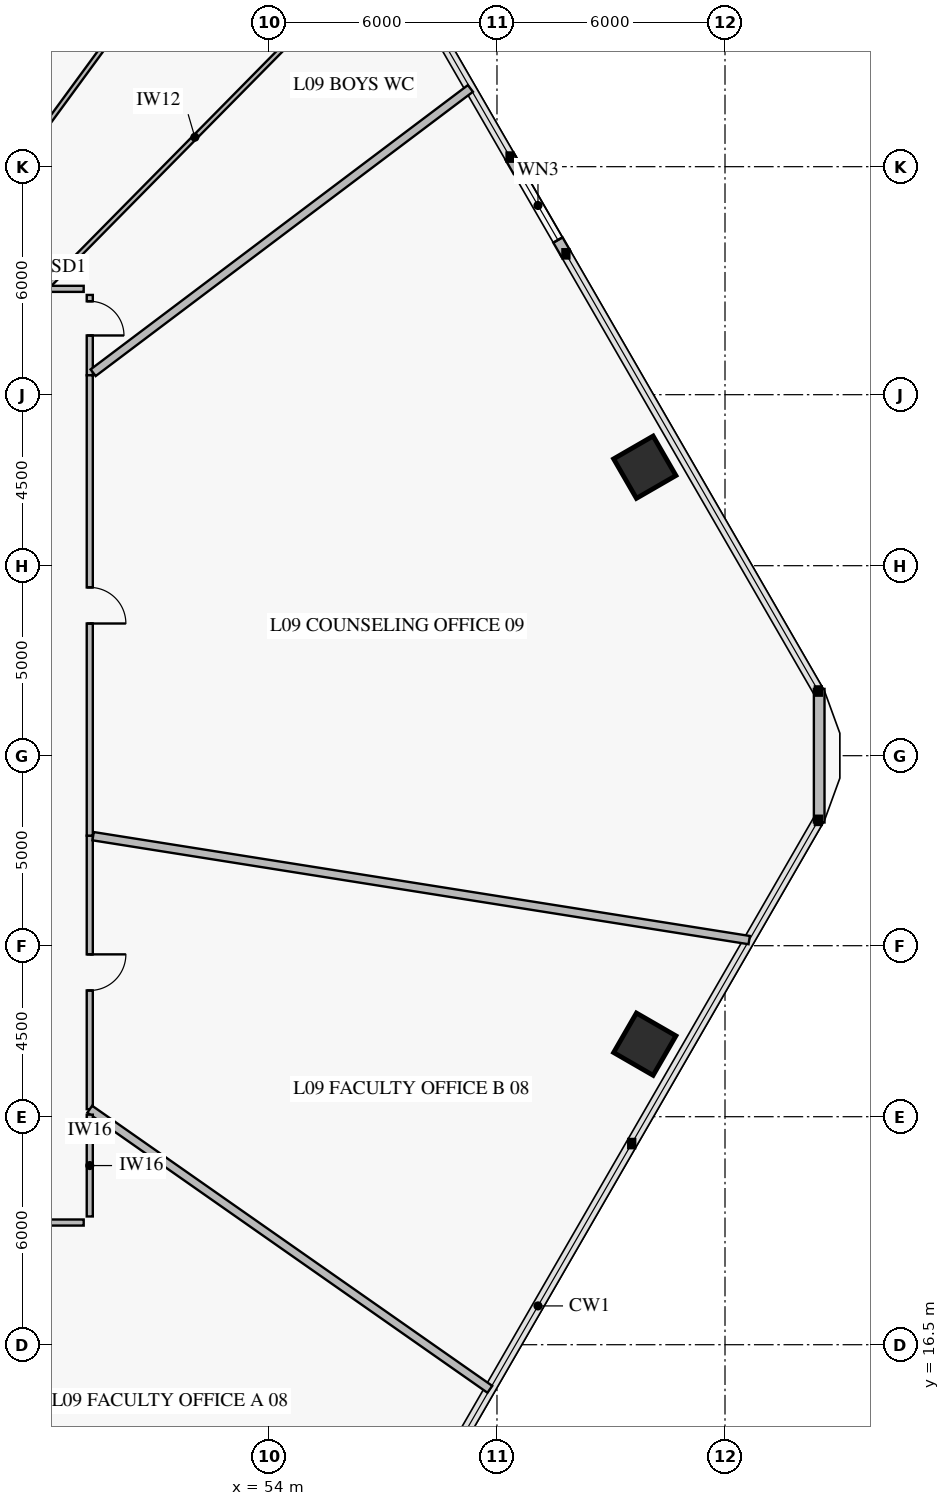
"""IFC4 building model, lengths in metres.
Left out: names, types, materials, properties, quantities, classifications, styles, units other than length and angle.
Written with IfcOpenShell. Run it as: python <this file> out.ifc"""

import sys

from ifc_helpers import new_model, si_unit, direction, frame, frame_2d, origin, origin_2d, place, context, subcontext, project, spatial, rectangle, extrude, element, fill, save


model = new_model("IFC4")
c1 = context("Model", 3, precision=1e-05, world=origin(), true_north=direction((0.0, 1.0)))
c2 = subcontext(c1, "Body", "Model", "MODEL_VIEW")
j1 = project(units=[si_unit("LENGTHUNIT", "METRE"), si_unit("PLANEANGLEUNIT", "RADIAN")], contexts=[c1])
p1 = place(None, origin())
s1 = spatial("IfcSite", under=j1, at=p1, CompositionType="ELEMENT")
p2 = place(p1, origin())
s2 = spatial("IfcBuilding", under=s1, at=p2, CompositionType="ELEMENT")
p3 = place(p2, frame((0.0, 0.0, 37.2)))
s3 = spatial("IfcBuildingStorey", under=s2, at=p3, CompositionType="ELEMENT", Elevation=37.2)
for number, where, z_axis, x_axis in (
    (1, (63.889, 39.592, 0.0), (0.0, 0.0, 1.0), (-0.5, 0.866, 0.0)),
    (2, (63.889, 24.408, 0.0), (0.0, 0.0, 1.0), (0.5, 0.866, 0.0)),
):
    element("IfcColumn", number, at=place(p3, frame(where, z_axis=z_axis, x_axis=x_axis)), inside=s3, PredefinedType="COLUMN", context=c2, shape_type="SweptSolid", body=[
        extrude(rectangle(XDim=1.2, YDim=1.2, at=origin_2d()), origin(), (0.0, 0.0, 1.0), 3.92),
    ])
p4 = place(p3, frame((60.344, 47.752, 0.0), z_axis=(0.0, 0.0, 1.0), x_axis=(0.500024377727, -0.866011328839, 0.0)))
e3 = element("IfcWall", 3, at=p4, inside=s3, PredefinedType="SOLIDWALL", context=c2, shape_type="SweptSolid", body=[
    extrude(rectangle(XDim=2.94, YDim=0.28, at=frame_2d((1.47, 0.0))), origin(), (0.0, 0.0, 1.0), 3.92),
])
p5 = place(p4, frame((0.42, 0.0, 0.7)))
e4 = element("IfcOpeningElement", 4, at=p5, cuts=e3, PredefinedType="OPENING", context=c2, shape_type="SweptSolid", body=[
    extrude(rectangle(XDim=2.1, YDim=1.5, at=frame_2d((1.05, 0.75))), frame((0.0, 0.152, 0.0), z_axis=(0.0, -1.0, 0.0), x_axis=(1.0, 0.0, 0.0)), (0.0, 0.0, 1.0), 0.304),
])
p6 = place(p3, frame((68.479, 33.758, 0.0), z_axis=(0.0, 0.0, 1.0), x_axis=(0.0, -1.0, 0.0)))
e5 = element("IfcWall", 5, at=p6, inside=s3, PredefinedType="SOLIDWALL", context=c2, shape_type="SweptSolid", body=[
    extrude(rectangle(XDim=3.515, YDim=0.28, at=frame_2d((1.758, 0.0))), origin(), (0.0, 0.0, 1.0), 3.92),
])
p7 = place(p3, frame((49.285, 42.011, 0.0), z_axis=(0.0, 0.0, 1.0), x_axis=(0.0, 1.0, 0.0)))
e6 = element("IfcWall", 6, at=p7, inside=s3, PredefinedType="PARTITIONING", context=c2, shape_type="SweptSolid", body=[
    extrude(rectangle(XDim=2.114, YDim=0.16, at=frame_2d((1.057, 0.0))), origin(), (0.0, 0.0, 1.0), 3.92),
])
p8 = place(p7, frame((1.047, 0.0, 0.0)))
e7 = element("IfcOpeningElement", 7, at=p8, cuts=e6, PredefinedType="OPENING", context=c2, shape_type="SweptSolid", body=[
    extrude(rectangle(XDim=0.9, YDim=2.1, at=frame_2d((0.45, 1.05))), frame((0.0, 0.092, 0.0), z_axis=(0.0, -1.0, 0.0), x_axis=(1.0, 0.0, 0.0)), (0.0, 0.0, 1.0), 0.184),
])
p9 = place(p3, frame((42.81, 19.715, 0.0), z_axis=(0.0, 0.0, 1.0), x_axis=(1.0, 0.0, 0.0)))
e8 = element("IfcWall", 8, at=p9, inside=s3, PredefinedType="PARTITIONING", context=c2, shape_type="SweptSolid", body=[
    extrude(rectangle(XDim=6.315, YDim=0.16, at=frame_2d((3.158, 0.0))), origin(), (0.0, 0.0, 1.0), 3.22),
])
p10 = place(p9, frame((2.683, 0.0, 0.0)))
e9 = element("IfcOpeningElement", 9, at=p10, cuts=e8, PredefinedType="OPENING", context=c2, shape_type="SweptSolid", body=[
    extrude(rectangle(XDim=0.95, YDim=2.1, at=frame_2d((0.475, 1.05))), frame((0.0, 0.092, 0.0), z_axis=(0.0, -1.0, 0.0), x_axis=(1.0, 0.0, 0.0)), (0.0, 0.0, 1.0), 0.184),
])
p11 = place(p3, frame((49.285, 22.698, 0.0), z_axis=(0.0, 0.0, 1.0), x_axis=(0.0, 1.0, 0.0)))
e10 = element("IfcWall", 10, at=p11, inside=s3, PredefinedType="PARTITIONING", context=c2, shape_type="SweptSolid", body=[
    extrude(rectangle(XDim=7.198, YDim=0.16, at=frame_2d((3.599, 0.0))), origin(), (0.0, 0.0, 1.0), 3.22),
])
p12 = place(p11, frame((3.124, 0.0, 0.0)))
e11 = element("IfcOpeningElement", 11, at=p12, cuts=e10, PredefinedType="OPENING", context=c2, shape_type="SweptSolid", body=[
    extrude(rectangle(XDim=0.95, YDim=2.1, at=frame_2d((0.475, 1.05))), frame((0.0, 0.092, 0.0), z_axis=(0.0, -1.0, 0.0), x_axis=(1.0, 0.0, 0.0)), (0.0, 0.0, 1.0), 0.184),
])
p13 = place(p3, frame((49.285, 29.896, 0.0), z_axis=(0.0, 0.0, 1.0), x_axis=(0.0, 1.0, 0.0)))
e12 = element("IfcWall", 12, at=p13, inside=s3, PredefinedType="PARTITIONING", context=c2, shape_type="SweptSolid", body=[
    extrude(rectangle(XDim=12.115, YDim=0.16, at=frame_2d((6.058, 0.0))), origin(), (0.0, 0.0, 1.0), 3.22),
])
p14 = place(p13, frame((5.583, 0.0, 0.0)))
e13 = element("IfcOpeningElement", 13, at=p14, cuts=e12, PredefinedType="OPENING", context=c2, shape_type="SweptSolid", body=[
    extrude(rectangle(XDim=0.95, YDim=2.1, at=frame_2d((0.475, 1.05))), frame((0.0, 0.092, 0.0), z_axis=(0.0, -1.0, 0.0), x_axis=(1.0, 0.0, 0.0)), (0.0, 0.0, 1.0), 0.184),
])
p15 = place(p3, frame((49.373, 42.077, 0.0), z_axis=(0.0, 0.0, 1.0), x_axis=(0.798630996951, 0.601821012187, 0.0)))
e14 = element("IfcWall", 14, at=p15, inside=s3, PredefinedType="PARTITIONING", context=c2, shape_type="SweptSolid", body=[
    extrude(rectangle(XDim=12.431, YDim=0.22, at=frame_2d((6.215, 0.0))), origin(), (0.0, 0.0, 1.0), 3.17),
])
p16 = place(p3, frame((49.125, 44.285, 0.0), z_axis=(0.0, 0.0, 1.0), x_axis=(-1.0, 0.0, 0.0)))
e15 = element("IfcWall", 15, at=p16, inside=s3, PredefinedType="PARTITIONING", context=c2, shape_type="SweptSolid", body=[
    extrude(rectangle(XDim=1.01, YDim=0.16, at=frame_2d((0.505, 0.0))), origin(), (0.0, 0.0, 1.0), 3.22),
])
p17 = place(p3, frame((48.201, 44.373, 0.0), z_axis=(0.0, 0.0, 1.0), x_axis=(0.702156728527, 0.712022421405, 0.0)))
e16 = element("IfcWall", 16, at=p17, inside=s3, PredefinedType="PARTITIONING", context=c2, shape_type="SweptSolid", body=[
    extrude(rectangle(XDim=10.963, YDim=0.12, at=frame_2d((5.481, 0.0))), origin(), (0.0, 0.0, 1.0), 3.22),
])
p18 = place(p3, frame((48.071, 48.493, 0.0), z_axis=(0.0, 0.0, 1.0), x_axis=(0.590600620108, 0.80696400634, 0.0)))
e17 = element("IfcWall", 17, at=p18, inside=s3, PredefinedType="PARTITIONING", context=c2, shape_type="SweptSolid", body=[
    extrude(rectangle(XDim=11.212, YDim=0.12, at=frame_2d((5.606, 0.0))), origin(), (0.0, 0.0, 1.0), 3.17),
])
p19 = place(p3, frame((45.142, 48.493, 0.0), z_axis=(0.0, 0.0, 1.0), x_axis=(0.484815156974, 0.874616638058, 0.0)))
e18 = element("IfcWall", 18, at=p19, inside=s3, PredefinedType="PARTITIONING", context=c2, shape_type="SweptSolid", body=[
    extrude(rectangle(XDim=14.027, YDim=0.22, at=frame_2d((7.014, 0.0))), origin(), (0.0, 0.0, 1.0), 3.17),
])
p20 = place(p3, frame((42.858, 19.627, 0.0), z_axis=(0.0, 0.0, 1.0), x_axis=(0.484814111505, -0.874617217579, 0.0)))
e19 = element("IfcWall", 19, at=p20, inside=s3, PredefinedType="PARTITIONING", context=c2, shape_type="SweptSolid", body=[
    extrude(rectangle(XDim=18.738, YDim=0.22, at=frame_2d((9.369, 0.0))), origin(), (0.0, 0.0, 1.0), 3.17),
])
p21 = place(p3, frame((49.285, 22.698, 0.0), z_axis=(0.0, 0.0, 1.0), x_axis=(0.819154265409, -0.57357326425, 0.0)))
e20 = element("IfcWall", 20, at=p21, inside=s3, PredefinedType="PARTITIONING", context=c2, shape_type="SweptSolid", body=[
    extrude(rectangle(XDim=12.851, YDim=0.22, at=frame_2d((6.426, 0.0))), origin(), (0.0, 0.0, 1.0), 3.17),
])
p22 = place(p3, frame((49.285, 19.875, 0.0), z_axis=(0.0, 0.0, 1.0), x_axis=(0.0, 1.0, 0.0)))
e21 = element("IfcWall", 21, at=p22, inside=s3, PredefinedType="PARTITIONING", context=c2, shape_type="SweptSolid", body=[
    extrude(rectangle(XDim=2.679, YDim=0.16, at=frame_2d((1.339, 0.0))), origin(), (0.0, 0.0, 1.0), 3.92),
])
p23 = place(p3, frame((49.373, 29.882, 0.0), z_axis=(0.0, 0.0, 1.0), x_axis=(0.987689809262, -0.156425191961, 0.0)))
e22 = element("IfcWall", 22, at=p23, inside=s3, PredefinedType="PARTITIONING", context=c2, shape_type="SweptSolid", body=[
    extrude(rectangle(XDim=17.479, YDim=0.22, at=frame_2d((8.739, 0.0))), origin(), (0.0, 0.0, 1.0), 3.17),
])
p24 = place(p5, origin())
e23 = element("IfcWindow", 23, at=p24, inside=s3, PartitioningType="SINGLE_PANEL", PredefinedType="WINDOW", context=c2, shape_type="SweptSolid", body=[
    extrude(rectangle(XDim=2.1, YDim=1.5, at=frame_2d((1.05, 0.75))), frame((0.0, 0.03, 0.0), z_axis=(0.0, -1.0, 0.0), x_axis=(1.0, 0.0, 0.0)), (0.0, 0.0, 1.0), 0.06),
])
fill(e4, e23)
p25 = place(p8, frame((0.9, 0.0, 0.0), z_axis=(0.0, 0.0, 1.0), x_axis=(-1.0, 0.0, 0.0)))
e24 = element("IfcDoor", 24, at=p25, inside=s3, OperationType="SINGLE_SWING_RIGHT", PredefinedType="DOOR", context=c2, shape_type="SweptSolid", body=[
    extrude(rectangle(XDim=0.9, YDim=2.1, at=frame_2d((0.45, 1.05))), frame((0.0, 0.025, 0.0), z_axis=(0.0, -1.0, 0.0), x_axis=(1.0, 0.0, 0.0)), (0.0, 0.0, 1.0), 0.05),
])
fill(e7, e24)
p26 = place(p12, frame((0.95, 0.0, 0.0), z_axis=(0.0, 0.0, 1.0), x_axis=(-1.0, 0.0, 0.0)))
e25 = element("IfcDoor", 25, at=p26, inside=s3, OperationType="SINGLE_SWING_LEFT", PredefinedType="DOOR", context=c2, shape_type="SweptSolid", body=[
    extrude(rectangle(XDim=0.95, YDim=2.1, at=frame_2d((0.475, 1.05))), frame((0.0, 0.025, 0.0), z_axis=(0.0, -1.0, 0.0), x_axis=(1.0, 0.0, 0.0)), (0.0, 0.0, 1.0), 0.05),
])
fill(e11, e25)
p27 = place(p14, frame((0.95, 0.0, 0.0), z_axis=(0.0, 0.0, 1.0), x_axis=(-1.0, 0.0, 0.0)))
e26 = element("IfcDoor", 26, at=p27, inside=s3, OperationType="SINGLE_SWING_RIGHT", PredefinedType="DOOR", context=c2, shape_type="SweptSolid", body=[
    extrude(rectangle(XDim=0.95, YDim=2.1, at=frame_2d((0.475, 1.05))), frame((0.0, 0.025, 0.0), z_axis=(0.0, -1.0, 0.0), x_axis=(1.0, 0.0, 0.0)), (0.0, 0.0, 1.0), 0.05),
])
fill(e13, e26)
save(model, sys.argv[1])
